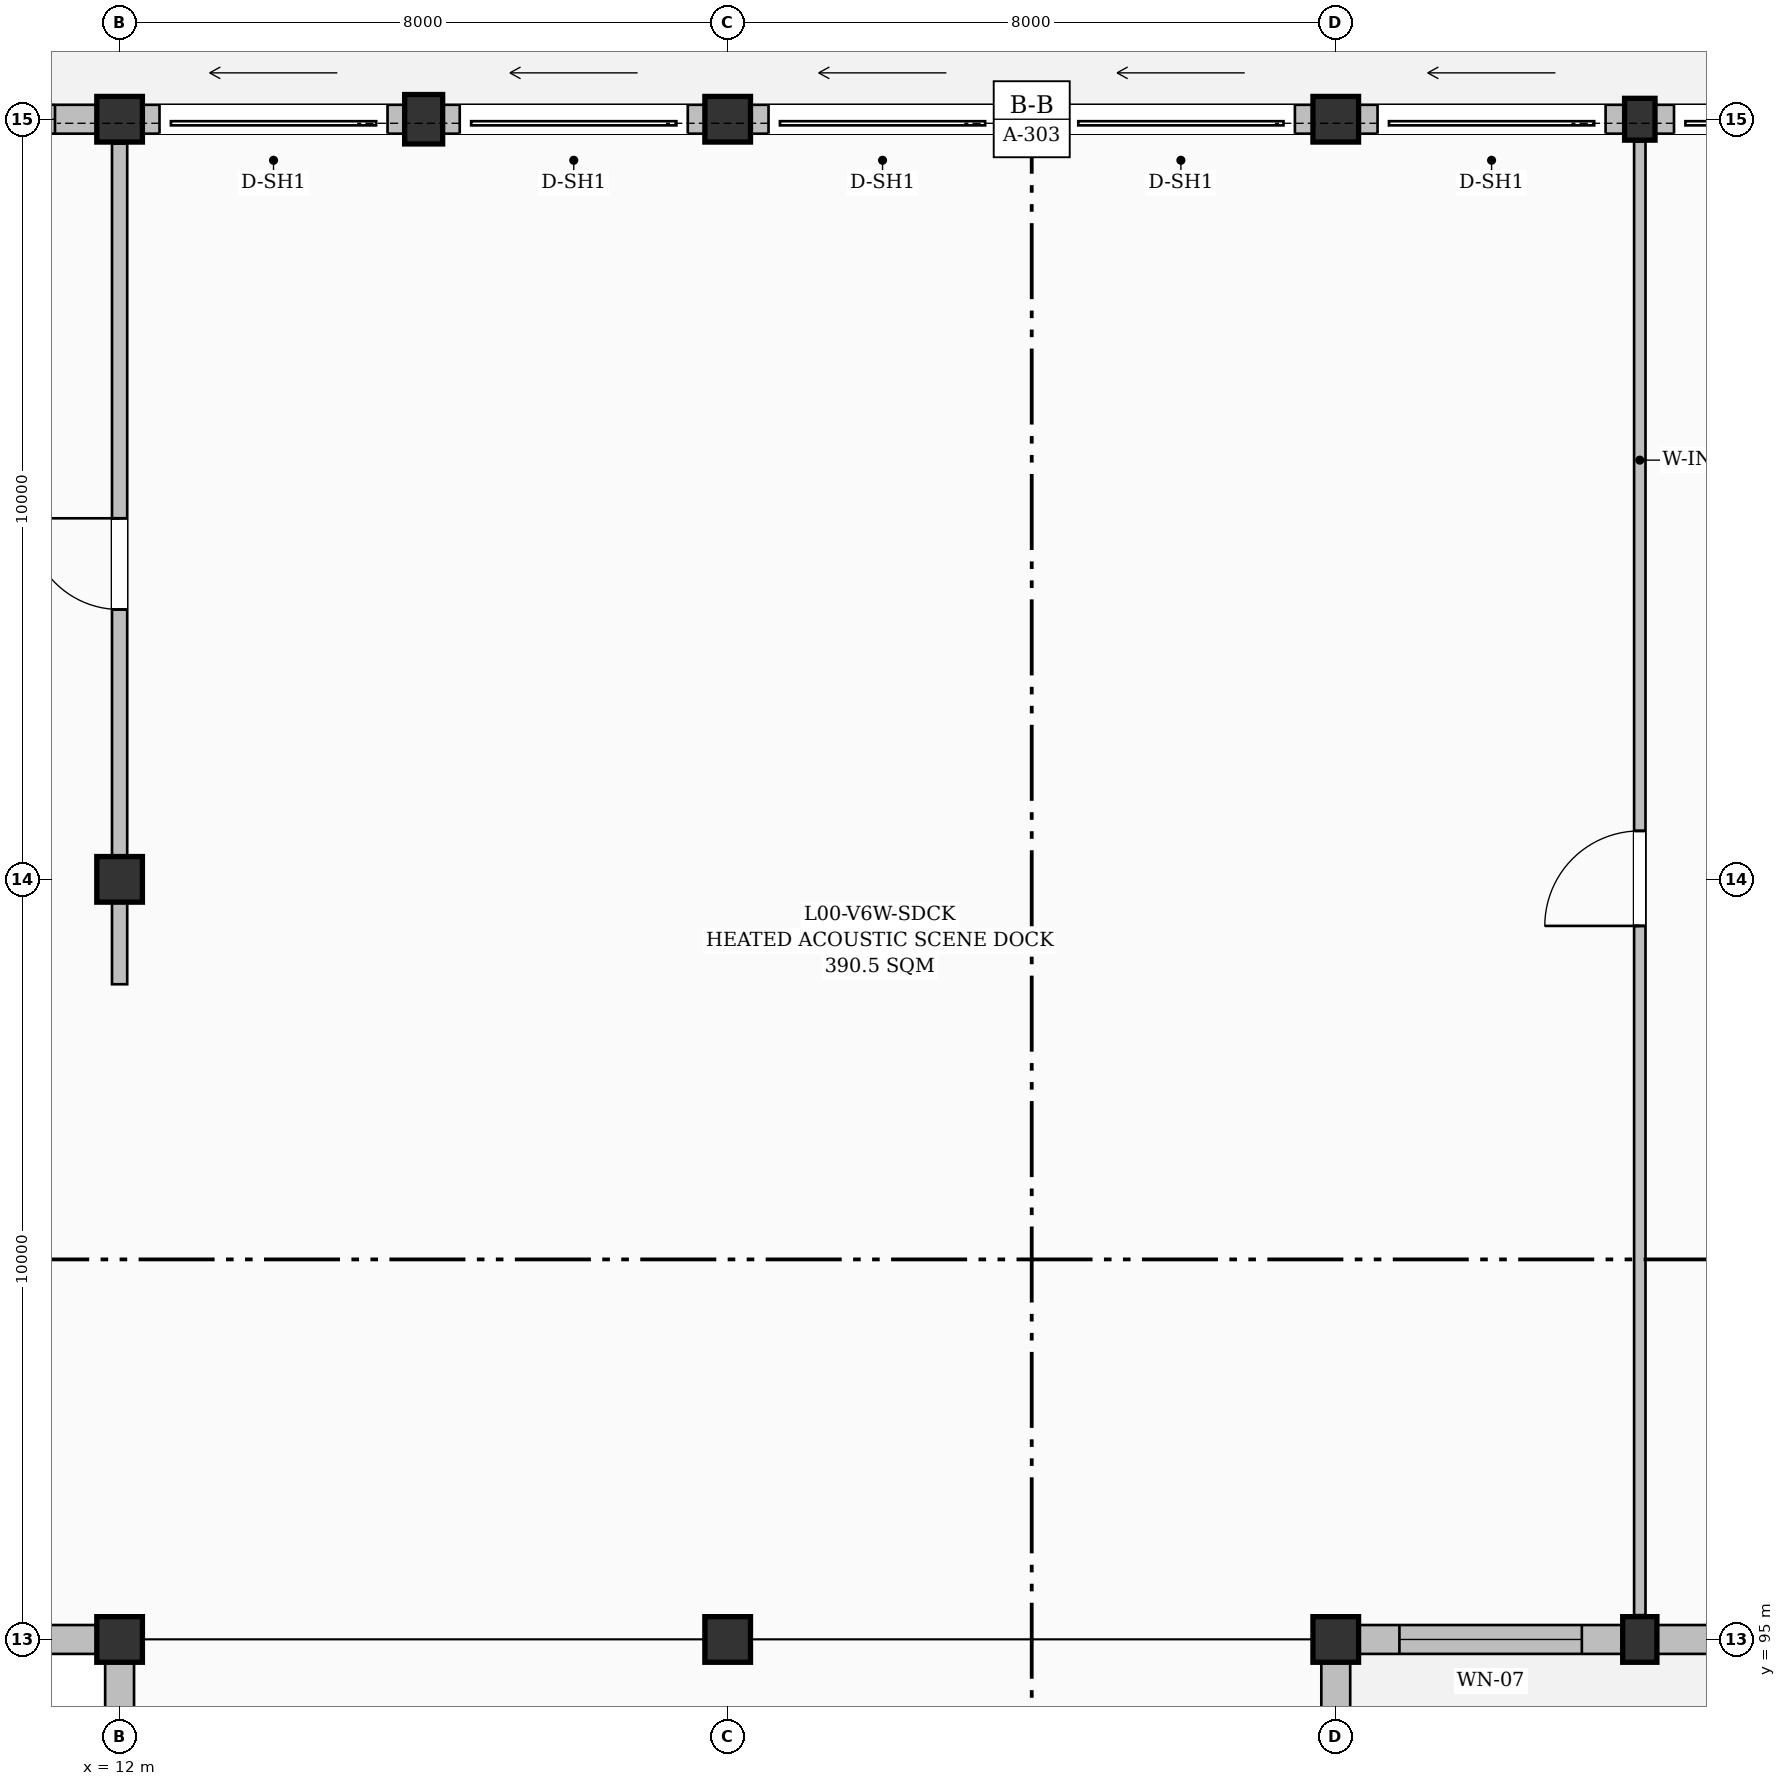
"""IFC4 building model, lengths in metres.
Left out: names, types, materials, properties, quantities, classifications, styles, units other than length and angle.
Written with IfcOpenShell. Run it as: python <this file> out.ifc"""

import sys

from ifc_helpers import new_model, si_unit, direction, frame, frame_2d, origin, origin_2d, place, context, subcontext, project, spatial, rectangle, extrude, element, fill, save


model = new_model("IFC4")
c1 = context("Model", 3, precision=1e-05, world=origin(), true_north=direction((0.0, 1.0)))
c2 = subcontext(c1, "Body", "Model", "MODEL_VIEW")
j1 = project(units=[si_unit("LENGTHUNIT", "METRE"), si_unit("PLANEANGLEUNIT", "RADIAN")], contexts=[c1])
p1 = place(None, origin())
s1 = spatial("IfcSite", under=j1, at=p1, CompositionType="ELEMENT")
p2 = place(p1, origin())
s2 = spatial("IfcBuilding", under=s1, at=p2, CompositionType="ELEMENT")
p3 = place(p2, origin())
s3 = spatial("IfcBuildingStorey", under=s2, at=p3, CompositionType="ELEMENT", Elevation=0.0)
for number, where, z_axis, x_axis in (
    (1, (12.0, 95.0, 0.0), (0.0, 0.0, 1.0), (1.0, 0.0, 0.0)),
    (2, (12.0, 105.0, 0.0), (0.0, 0.0, 1.0), (1.0, 0.0, 0.0)),
    (3, (12.0, 115.0, 0.0), (0.0, 0.0, 1.0), (1.0, 0.0, 0.0)),
):
    element("IfcColumn", number, at=place(p3, frame(where, z_axis=z_axis, x_axis=x_axis)), inside=s3, PredefinedType="COLUMN", context=c2, shape_type="SweptSolid", body=[
        extrude(rectangle(XDim=0.6, YDim=0.6, at=origin_2d()), origin(), (0.0, 0.0, 1.0), 4.8),
    ])
p4 = place(p3, frame((16.0, 115.0, 0.0), z_axis=(0.0, 0.0, 1.0), x_axis=(1.0, 0.0, 0.0)))
e4 = element("IfcColumn", 4, at=p4, inside=s3, PredefinedType="PILASTER", context=c2, shape_type="SweptSolid", body=[
    extrude(rectangle(XDim=0.5, YDim=0.65, at=origin_2d()), origin(), (0.0, 0.0, 1.0), 4.8),
])
for number, where, z_axis, x_axis in (
    (5, (20.0, 95.0, 0.0), (0.0, 0.0, 1.0), (1.0, 0.0, 0.0)),
    (6, (20.0, 115.0, 0.0), (0.0, 0.0, 1.0), (1.0, 0.0, 0.0)),
):
    element("IfcColumn", number, at=place(p3, frame(where, z_axis=z_axis, x_axis=x_axis)), inside=s3, PredefinedType="COLUMN", context=c2, shape_type="SweptSolid", body=[
        extrude(rectangle(XDim=0.6, YDim=0.6, at=origin_2d()), origin(), (0.0, 0.0, 1.0), 4.8),
    ])
p5 = place(p3, frame((24.0, 115.0, 0.0), z_axis=(0.0, 0.0, 1.0), x_axis=(1.0, 0.0, 0.0)))
e7 = element("IfcColumn", 7, at=p5, inside=s3, PredefinedType="PILASTER", context=c2, shape_type="SweptSolid", body=[
    extrude(rectangle(XDim=0.45, YDim=0.6, at=origin_2d()), origin(), (0.0, 0.0, 1.0), 4.8),
])
for number, where, z_axis, x_axis in (
    (8, (28.0, 95.0, 0.0), (0.0, 0.0, 1.0), (1.0, 0.0, 0.0)),
    (9, (28.0, 115.0, 0.0), (0.0, 0.0, 1.0), (1.0, 0.0, 0.0)),
):
    element("IfcColumn", number, at=place(p3, frame(where, z_axis=z_axis, x_axis=x_axis)), inside=s3, PredefinedType="COLUMN", context=c2, shape_type="SweptSolid", body=[
        extrude(rectangle(XDim=0.6, YDim=0.6, at=origin_2d()), origin(), (0.0, 0.0, 1.0), 4.8),
    ])
p6 = place(p3, frame((32.0, 95.0, 0.0), z_axis=(0.0, 0.0, 1.0), x_axis=(1.0, 0.0, 0.0)))
e10 = element("IfcColumn", 10, at=p6, inside=s3, PredefinedType="PILASTER", context=c2, shape_type="SweptSolid", body=[
    extrude(rectangle(XDim=0.45, YDim=0.6, at=origin_2d()), origin(), (0.0, 0.0, 1.0), 4.8),
])
p7 = place(p3, frame((32.0, 115.0, 0.0), z_axis=(0.0, 0.0, 1.0), x_axis=(1.0, 0.0, 0.0)))
e11 = element("IfcColumn", 11, at=p7, inside=s3, PredefinedType="PILASTER", context=c2, shape_type="SweptSolid", body=[
    extrude(rectangle(XDim=0.4, YDim=0.55, at=origin_2d()), origin(), (0.0, 0.0, 1.0), 4.8),
])
p8 = place(p3, frame((8.2, 115.0, 0.0), z_axis=(0.0, 0.0, 1.0), x_axis=(1.0, 0.0, 0.0)))
e12 = element("IfcWall", 12, at=p8, inside=s3, PredefinedType="SOLIDWALL", context=c2, shape_type="SweptSolid", body=[
    extrude(rectangle(XDim=3.5, YDim=0.38, at=frame_2d((1.75, 0.0))), origin(), (0.0, 0.0, 1.0), 3.935),
])
p9 = place(p8, frame((0.55, 0.0, 0.95)))
e13 = element("IfcOpeningElement", 13, at=p9, cuts=e12, PredefinedType="OPENING", context=c2, shape_type="SweptSolid", body=[
    extrude(rectangle(XDim=2.4, YDim=1.5, at=frame_2d((1.2, 0.75))), frame((0.0, 0.2, 0.0), z_axis=(0.0, -1.0, 0.0), x_axis=(1.0, 0.0, 0.0)), (0.0, 0.0, 1.0), 0.4),
])
p10 = place(p3, frame((12.3, 115.0, 0.0), z_axis=(0.0, 0.0, 1.0), x_axis=(1.0, 0.0, 0.0)))
e14 = element("IfcWall", 14, at=p10, inside=s3, PredefinedType="SOLIDWALL", context=c2, shape_type="SweptSolid", body=[
    extrude(rectangle(XDim=3.45, YDim=0.38, at=frame_2d((1.725, 0.0))), origin(), (0.0, 0.0, 1.0), 4.235),
])
p11 = place(p10, frame((0.225, 0.0, 0.0)))
e15 = element("IfcOpeningElement", 15, at=p11, cuts=e14, PredefinedType="OPENING", context=c2, shape_type="SweptSolid", body=[
    extrude(rectangle(XDim=3.0, YDim=3.1, at=frame_2d((1.5, 1.55))), frame((0.0, 0.2, 0.0), z_axis=(0.0, -1.0, 0.0), x_axis=(1.0, 0.0, 0.0)), (0.0, 0.0, 1.0), 0.4),
])
p12 = place(p3, frame((16.25, 115.0, 0.0), z_axis=(0.0, 0.0, 1.0), x_axis=(1.0, 0.0, 0.0)))
e16 = element("IfcWall", 16, at=p12, inside=s3, PredefinedType="SOLIDWALL", context=c2, shape_type="SweptSolid", body=[
    extrude(rectangle(XDim=3.45, YDim=0.38, at=frame_2d((1.725, 0.0))), origin(), (0.0, 0.0, 1.0), 4.235),
])
p13 = place(p12, frame((0.225, 0.0, 0.0)))
e17 = element("IfcOpeningElement", 17, at=p13, cuts=e16, PredefinedType="OPENING", context=c2, shape_type="SweptSolid", body=[
    extrude(rectangle(XDim=3.0, YDim=3.1, at=frame_2d((1.5, 1.55))), frame((0.0, 0.2, 0.0), z_axis=(0.0, -1.0, 0.0), x_axis=(1.0, 0.0, 0.0)), (0.0, 0.0, 1.0), 0.4),
])
p14 = place(p3, frame((20.3, 115.0, 0.0), z_axis=(0.0, 0.0, 1.0), x_axis=(1.0, 0.0, 0.0)))
e18 = element("IfcWall", 18, at=p14, inside=s3, PredefinedType="SOLIDWALL", context=c2, shape_type="SweptSolid", body=[
    extrude(rectangle(XDim=3.475, YDim=0.38, at=frame_2d((1.737, 0.0))), origin(), (0.0, 0.0, 1.0), 4.035),
])
p15 = place(p14, frame((0.238, 0.0, 0.0)))
e19 = element("IfcOpeningElement", 19, at=p15, cuts=e18, PredefinedType="OPENING", context=c2, shape_type="SweptSolid", body=[
    extrude(rectangle(XDim=3.0, YDim=3.1, at=frame_2d((1.5, 1.55))), frame((0.0, 0.2, 0.0), z_axis=(0.0, -1.0, 0.0), x_axis=(1.0, 0.0, 0.0)), (0.0, 0.0, 1.0), 0.4),
])
p16 = place(p3, frame((24.225, 115.0, 0.0), z_axis=(0.0, 0.0, 1.0), x_axis=(1.0, 0.0, 0.0)))
e20 = element("IfcWall", 20, at=p16, inside=s3, PredefinedType="SOLIDWALL", context=c2, shape_type="SweptSolid", body=[
    extrude(rectangle(XDim=3.475, YDim=0.38, at=frame_2d((1.737, 0.0))), origin(), (0.0, 0.0, 1.0), 4.035),
])
p17 = place(p16, frame((0.238, 0.0, 0.0)))
e21 = element("IfcOpeningElement", 21, at=p17, cuts=e20, PredefinedType="OPENING", context=c2, shape_type="SweptSolid", body=[
    extrude(rectangle(XDim=3.0, YDim=3.1, at=frame_2d((1.5, 1.55))), frame((0.0, 0.2, 0.0), z_axis=(0.0, -1.0, 0.0), x_axis=(1.0, 0.0, 0.0)), (0.0, 0.0, 1.0), 0.4),
])
p18 = place(p3, frame((28.3, 115.0, 0.0), z_axis=(0.0, 0.0, 1.0), x_axis=(1.0, 0.0, 0.0)))
e22 = element("IfcWall", 22, at=p18, inside=s3, PredefinedType="SOLIDWALL", context=c2, shape_type="SweptSolid", body=[
    extrude(rectangle(XDim=3.5, YDim=0.38, at=frame_2d((1.75, 0.0))), origin(), (0.0, 0.0, 1.0), 3.985),
])
p19 = place(p18, frame((0.25, 0.0, 0.0)))
e23 = element("IfcOpeningElement", 23, at=p19, cuts=e22, PredefinedType="OPENING", context=c2, shape_type="SweptSolid", body=[
    extrude(rectangle(XDim=3.0, YDim=3.1, at=frame_2d((1.5, 1.55))), frame((0.0, 0.2, 0.0), z_axis=(0.0, -1.0, 0.0), x_axis=(1.0, 0.0, 0.0)), (0.0, 0.0, 1.0), 0.4),
])
p20 = place(p3, frame((32.2, 115.0, 0.0), z_axis=(0.0, 0.0, 1.0), x_axis=(1.0, 0.0, 0.0)))
e24 = element("IfcWall", 24, at=p20, inside=s3, PredefinedType="SOLIDWALL", context=c2, shape_type="SweptSolid", body=[
    extrude(rectangle(XDim=3.5, YDim=0.38, at=frame_2d((1.75, 0.0))), origin(), (0.0, 0.0, 1.0), 3.985),
])
p21 = place(p20, frame((0.25, 0.0, 0.0)))
e25 = element("IfcOpeningElement", 25, at=p21, cuts=e24, PredefinedType="OPENING", context=c2, shape_type="SweptSolid", body=[
    extrude(rectangle(XDim=3.0, YDim=3.1, at=frame_2d((1.5, 1.55))), frame((0.0, 0.2, 0.0), z_axis=(0.0, -1.0, 0.0), x_axis=(1.0, 0.0, 0.0)), (0.0, 0.0, 1.0), 0.4),
])
p22 = place(p3, frame((35.7, 95.0, 0.0), z_axis=(0.0, 0.0, 1.0), x_axis=(-1.0, 0.0, 0.0)))
e26 = element("IfcWall", 26, at=p22, inside=s3, PredefinedType="SOLIDWALL", context=c2, shape_type="SweptSolid", body=[
    extrude(rectangle(XDim=3.475, YDim=0.38, at=frame_2d((1.737, 0.0))), origin(), (0.0, 0.0, 1.0), 4.235),
])
p23 = place(p22, frame((0.837, 0.0, 0.95)))
e27 = element("IfcOpeningElement", 27, at=p23, cuts=e26, PredefinedType="OPENING", context=c2, shape_type="SweptSolid", body=[
    extrude(rectangle(XDim=1.8, YDim=1.8, at=frame_2d((0.9, 0.9))), frame((0.0, 0.2, 0.0), z_axis=(0.0, -1.0, 0.0), x_axis=(1.0, 0.0, 0.0)), (0.0, 0.0, 1.0), 0.4),
])
p24 = place(p3, frame((31.775, 95.0, 0.0), z_axis=(0.0, 0.0, 1.0), x_axis=(-1.0, 0.0, 0.0)))
e28 = element("IfcWall", 28, at=p24, inside=s3, PredefinedType="SOLIDWALL", context=c2, shape_type="SweptSolid", body=[
    extrude(rectangle(XDim=3.475, YDim=0.38, at=frame_2d((1.737, 0.0))), origin(), (0.0, 0.0, 1.0), 4.235),
])
p25 = place(p24, frame((0.538, 0.0, 0.95)))
e29 = element("IfcOpeningElement", 29, at=p25, cuts=e28, PredefinedType="OPENING", context=c2, shape_type="SweptSolid", body=[
    extrude(rectangle(XDim=2.4, YDim=1.8, at=frame_2d((1.2, 0.9))), frame((0.0, 0.2, 0.0), z_axis=(0.0, -1.0, 0.0), x_axis=(1.0, 0.0, 0.0)), (0.0, 0.0, 1.0), 0.4),
])
p26 = place(p3, frame((11.7, 95.0, 0.0), z_axis=(0.0, 0.0, 1.0), x_axis=(-1.0, 0.0, 0.0)))
e30 = element("IfcWall", 30, at=p26, inside=s3, PredefinedType="SOLIDWALL", context=c2, shape_type="SweptSolid", body=[
    extrude(rectangle(XDim=3.475, YDim=0.38, at=frame_2d((1.737, 0.0))), origin(), (0.0, 0.0, 1.0), 4.035),
])
p27 = place(p26, frame((0.837, 0.0, 0.95)))
e31 = element("IfcOpeningElement", 31, at=p27, cuts=e30, PredefinedType="OPENING", context=c2, shape_type="SweptSolid", body=[
    extrude(rectangle(XDim=1.8, YDim=1.5, at=frame_2d((0.9, 0.75))), frame((0.0, 0.2, 0.0), z_axis=(0.0, -1.0, 0.0), x_axis=(1.0, 0.0, 0.0)), (0.0, 0.0, 1.0), 0.4),
])
p28 = place(p3, frame((12.0, 90.325, 0.0), z_axis=(0.0, 0.0, 1.0), x_axis=(0.0, 1.0, 0.0)))
e32 = element("IfcWall", 32, at=p28, inside=s3, PredefinedType="SOLIDWALL", context=c2, shape_type="SweptSolid", body=[
    extrude(rectangle(XDim=4.375, YDim=0.38, at=frame_2d((2.188, 0.0))), origin(), (0.0, 0.0, 1.0), 3.945),
])
p29 = place(p28, frame((1.538, 0.0, 0.95)))
e33 = element("IfcOpeningElement", 33, at=p29, cuts=e32, PredefinedType="OPENING", context=c2, shape_type="SweptSolid", body=[
    extrude(rectangle(XDim=1.3, YDim=1.4, at=frame_2d((0.65, 0.7))), frame((0.0, 0.2, 0.0), z_axis=(0.0, -1.0, 0.0), x_axis=(1.0, 0.0, 0.0)), (0.0, 0.0, 1.0), 0.4),
])
p30 = place(p3, frame((28.0, 94.7, 0.0), z_axis=(0.0, 0.0, 1.0), x_axis=(0.0, -1.0, 0.0)))
e34 = element("IfcWall", 34, at=p30, inside=s3, PredefinedType="SOLIDWALL", context=c2, shape_type="SweptSolid", body=[
    extrude(rectangle(XDim=4.375, YDim=0.38, at=frame_2d((2.188, 0.0))), origin(), (0.0, 0.0, 1.0), 3.945),
])
p31 = place(p30, frame((1.538, 0.0, 0.95)))
e35 = element("IfcOpeningElement", 35, at=p31, cuts=e34, PredefinedType="OPENING", context=c2, shape_type="SweptSolid", body=[
    extrude(rectangle(XDim=1.3, YDim=1.4, at=frame_2d((0.65, 0.7))), frame((0.0, 0.2, 0.0), z_axis=(0.0, -1.0, 0.0), x_axis=(1.0, 0.0, 0.0)), (0.0, 0.0, 1.0), 0.4),
])
p32 = place(p3, frame((32.0, 95.32, 0.0), z_axis=(0.0, 0.0, 1.0), x_axis=(0.0, 1.0, 0.0)))
e36 = element("IfcWall", 36, at=p32, inside=s3, PredefinedType="PARTITIONING", context=c2, shape_type="SweptSolid", body=[
    extrude(rectangle(XDim=19.385, YDim=0.15, at=frame_2d((9.692, 0.0))), origin(), (0.0, 0.0, 1.0), 4.55),
])
p33 = place(p32, frame((9.067, 0.0, 0.0)))
e37 = element("IfcOpeningElement", 37, at=p33, cuts=e36, PredefinedType="OPENING", context=c2, shape_type="SweptSolid", body=[
    extrude(rectangle(XDim=1.25, YDim=2.15, at=frame_2d((0.625, 1.075))), frame((0.0, 0.085, 0.0), z_axis=(0.0, -1.0, 0.0), x_axis=(1.0, 0.0, 0.0)), (0.0, 0.0, 1.0), 0.17),
])
p34 = place(p3, frame((12.0, 103.62, 0.0), z_axis=(0.0, 0.0, 1.0), x_axis=(0.0, 1.0, 0.0)))
e38 = element("IfcWall", 38, at=p34, inside=s3, PredefinedType="PARTITIONING", context=c2, shape_type="SweptSolid", body=[
    extrude(rectangle(XDim=11.06, YDim=0.2, at=frame_2d((5.53, 0.0))), origin(), (0.0, 0.0, 1.0), 3.585),
])
p35 = place(p34, frame((4.93, 0.0, 0.0)))
e39 = element("IfcOpeningElement", 39, at=p35, cuts=e38, PredefinedType="OPENING", context=c2, shape_type="SweptSolid", body=[
    extrude(rectangle(XDim=1.2, YDim=2.2, at=frame_2d((0.6, 1.1))), frame((0.0, 0.11, 0.0), z_axis=(0.0, -1.0, 0.0), x_axis=(1.0, 0.0, 0.0)), (0.0, 0.0, 1.0), 0.22),
])
p36 = place(p9, origin())
e40 = element("IfcWindow", 40, at=p36, inside=s3, PartitioningType="TRIPLE_PANEL_VERTICAL", PredefinedType="WINDOW", context=c2, shape_type="SweptSolid", body=[
    extrude(rectangle(XDim=2.4, YDim=1.5, at=frame_2d((1.2, 0.75))), frame((0.0, 0.03, 0.0), z_axis=(0.0, -1.0, 0.0), x_axis=(1.0, 0.0, 0.0)), (0.0, 0.0, 1.0), 0.06),
])
fill(e13, e40)
p37 = place(p11, origin())
e41 = element("IfcDoor", 41, at=p37, inside=s3, OperationType="ROLLINGUP", PredefinedType="DOOR", context=c2, shape_type="SweptSolid", body=[
    extrude(rectangle(XDim=3.0, YDim=3.1, at=frame_2d((1.5, 1.55))), frame((0.0, 0.025, 0.0), z_axis=(0.0, -1.0, 0.0), x_axis=(1.0, 0.0, 0.0)), (0.0, 0.0, 1.0), 0.05),
])
fill(e15, e41)
p38 = place(p13, origin())
e42 = element("IfcDoor", 42, at=p38, inside=s3, OperationType="ROLLINGUP", PredefinedType="DOOR", context=c2, shape_type="SweptSolid", body=[
    extrude(rectangle(XDim=3.0, YDim=3.1, at=frame_2d((1.5, 1.55))), frame((0.0, 0.025, 0.0), z_axis=(0.0, -1.0, 0.0), x_axis=(1.0, 0.0, 0.0)), (0.0, 0.0, 1.0), 0.05),
])
fill(e17, e42)
p39 = place(p15, origin())
e43 = element("IfcDoor", 43, at=p39, inside=s3, OperationType="ROLLINGUP", PredefinedType="DOOR", context=c2, shape_type="SweptSolid", body=[
    extrude(rectangle(XDim=3.0, YDim=3.1, at=frame_2d((1.5, 1.55))), frame((0.0, 0.025, 0.0), z_axis=(0.0, -1.0, 0.0), x_axis=(1.0, 0.0, 0.0)), (0.0, 0.0, 1.0), 0.05),
])
fill(e19, e43)
p40 = place(p17, origin())
e44 = element("IfcDoor", 44, at=p40, inside=s3, OperationType="ROLLINGUP", PredefinedType="DOOR", context=c2, shape_type="SweptSolid", body=[
    extrude(rectangle(XDim=3.0, YDim=3.1, at=frame_2d((1.5, 1.55))), frame((0.0, 0.025, 0.0), z_axis=(0.0, -1.0, 0.0), x_axis=(1.0, 0.0, 0.0)), (0.0, 0.0, 1.0), 0.05),
])
fill(e21, e44)
p41 = place(p19, origin())
e45 = element("IfcDoor", 45, at=p41, inside=s3, OperationType="ROLLINGUP", PredefinedType="DOOR", context=c2, shape_type="SweptSolid", body=[
    extrude(rectangle(XDim=3.0, YDim=3.1, at=frame_2d((1.5, 1.55))), frame((0.0, 0.025, 0.0), z_axis=(0.0, -1.0, 0.0), x_axis=(1.0, 0.0, 0.0)), (0.0, 0.0, 1.0), 0.05),
])
fill(e23, e45)
p42 = place(p21, origin())
e46 = element("IfcDoor", 46, at=p42, inside=s3, OperationType="ROLLINGUP", PredefinedType="DOOR", context=c2, shape_type="SweptSolid", body=[
    extrude(rectangle(XDim=3.0, YDim=3.1, at=frame_2d((1.5, 1.55))), frame((0.0, 0.025, 0.0), z_axis=(0.0, -1.0, 0.0), x_axis=(1.0, 0.0, 0.0)), (0.0, 0.0, 1.0), 0.05),
])
fill(e25, e46)
p43 = place(p25, origin())
e47 = element("IfcWindow", 47, at=p43, inside=s3, PartitioningType="TRIPLE_PANEL_VERTICAL", PredefinedType="WINDOW", context=c2, shape_type="SweptSolid", body=[
    extrude(rectangle(XDim=2.4, YDim=1.8, at=frame_2d((1.2, 0.9))), frame((0.0, 0.03, 0.0), z_axis=(0.0, -1.0, 0.0), x_axis=(1.0, 0.0, 0.0)), (0.0, 0.0, 1.0), 0.06),
])
fill(e29, e47)
p44 = place(p33, origin())
e48 = element("IfcDoor", 48, at=p44, inside=s3, OperationType="SINGLE_SWING_LEFT", PredefinedType="DOOR", context=c2, shape_type="SweptSolid", body=[
    extrude(rectangle(XDim=1.25, YDim=2.15, at=frame_2d((0.625, 1.075))), frame((0.0, 0.025, 0.0), z_axis=(0.0, -1.0, 0.0), x_axis=(1.0, 0.0, 0.0)), (0.0, 0.0, 1.0), 0.05),
])
fill(e37, e48)
p45 = place(p35, origin())
e49 = element("IfcDoor", 49, at=p45, inside=s3, OperationType="SINGLE_SWING_RIGHT", PredefinedType="DOOR", context=c2, shape_type="SweptSolid", body=[
    extrude(rectangle(XDim=1.2, YDim=2.2, at=frame_2d((0.6, 1.1))), frame((0.0, 0.025, 0.0), z_axis=(0.0, -1.0, 0.0), x_axis=(1.0, 0.0, 0.0)), (0.0, 0.0, 1.0), 0.05),
])
fill(e39, e49)
save(model, sys.argv[1])
